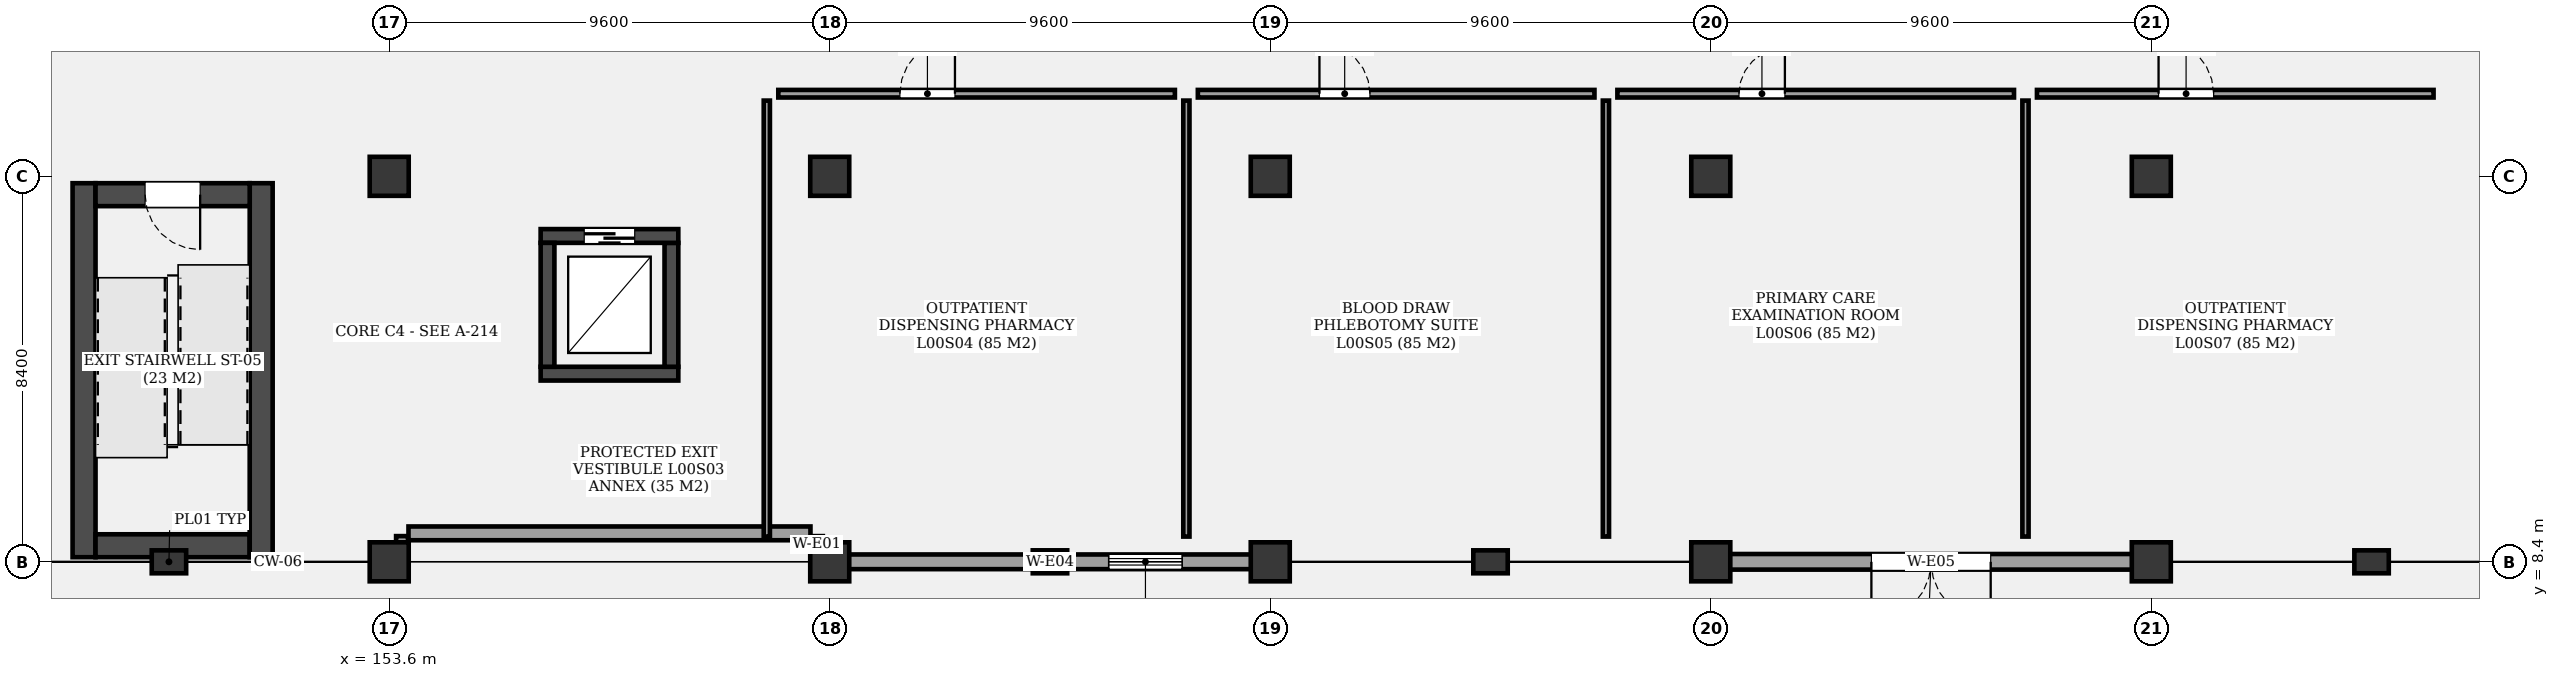
"""IFC4 building model, lengths in metres.
Left out: names, types, materials, properties, quantities, classifications, styles, units other than length and angle.
Written with IfcOpenShell. Run it as: python <this file> out.ifc"""

import sys

from ifc_helpers import new_model, si_unit, direction, frame, frame_2d, origin, origin_2d, place, context, subcontext, project, spatial, rectangle, extrude, element, fill, save


model = new_model("IFC4")
c1 = context("Model", 3, precision=1e-05, world=origin(), true_north=direction((0.0, 1.0)))
c2 = subcontext(c1, "Body", "Model", "MODEL_VIEW")
j1 = project(units=[si_unit("LENGTHUNIT", "METRE"), si_unit("PLANEANGLEUNIT", "RADIAN")], contexts=[c1])
p1 = place(None, origin())
s1 = spatial("IfcSite", under=j1, at=p1, CompositionType="ELEMENT")
p2 = place(p1, origin())
s2 = spatial("IfcBuilding", under=s1, at=p2, CompositionType="ELEMENT")
p3 = place(p2, origin())
s3 = spatial("IfcBuildingStorey", under=s2, at=p3, CompositionType="ELEMENT", Elevation=0.0)
for number, where, z_axis, x_axis in (
    (1, (153.6, 8.4, -0.35), (0.0, 0.0, 1.0), (1.0, 0.0, 0.0)),
    (2, (153.6, 16.8, -0.35), (0.0, 0.0, 1.0), (1.0, 0.0, 0.0)),
    (3, (163.2, 8.4, -0.35), (0.0, 0.0, 1.0), (1.0, 0.0, 0.0)),
    (4, (163.2, 16.8, -0.35), (0.0, 0.0, 1.0), (1.0, 0.0, 0.0)),
    (5, (172.8, 8.4, -0.35), (0.0, 0.0, 1.0), (1.0, 0.0, 0.0)),
    (6, (172.8, 16.8, -0.35), (0.0, 0.0, 1.0), (1.0, 0.0, 0.0)),
    (7, (182.4, 8.4, -0.35), (0.0, 0.0, 1.0), (1.0, 0.0, 0.0)),
    (8, (182.4, 16.8, -0.35), (0.0, 0.0, 1.0), (1.0, 0.0, 0.0)),
    (9, (192.0, 8.4, -0.35), (0.0, 0.0, 1.0), (1.0, 0.0, 0.0)),
    (10, (192.0, 16.8, -0.35), (0.0, 0.0, 1.0), (1.0, 0.0, 0.0)),
):
    element("IfcColumn", number, at=place(p3, frame(where, z_axis=z_axis, x_axis=x_axis)), inside=s3, PredefinedType="COLUMN", context=c2, shape_type="SweptSolid", body=[
        extrude(rectangle(XDim=0.85, YDim=0.85, at=origin_2d()), origin(), (0.0, 0.0, 1.0), 5.45),
    ])
for number, where, z_axis, x_axis in (
    (11, (148.8, 8.4, 0.0), (0.0, 0.0, 1.0), (1.0, 0.0, 0.0)),
    (12, (168.0, 8.4, 0.0), (0.0, 0.0, 1.0), (1.0, 0.0, 0.0)),
    (13, (177.6, 8.4, 0.0), (0.0, 0.0, 1.0), (1.0, 0.0, 0.0)),
    (14, (196.8, 8.4, 0.0), (0.0, 0.0, 1.0), (1.0, 0.0, 0.0)),
):
    element("IfcColumn", number, at=place(p3, frame(where, z_axis=z_axis, x_axis=x_axis)), inside=s3, PredefinedType="PILASTER", context=c2, shape_type="SweptSolid", body=[
        extrude(rectangle(XDim=0.75, YDim=0.5, at=origin_2d()), origin(), (0.0, 0.0, 1.0), 5.1),
    ])
p4 = place(p3, frame((146.95, 16.65, 0.0), z_axis=(0.0, 0.0, 1.0), x_axis=(0.0, -1.0, 0.0)))
e15 = element("IfcWall", 15, at=p4, inside=s3, PredefinedType="SHEAR", context=c2, shape_type="SweptSolid", body=[
    extrude(rectangle(XDim=8.15, YDim=0.5, at=frame_2d((4.075, 0.0))), origin(), (0.0, 0.0, 1.0), 5.1),
])
p5 = place(p3, frame((147.2, 8.75, 0.0), z_axis=(0.0, 0.0, 1.0), x_axis=(1.0, 0.0, 0.0)))
e16 = element("IfcWall", 16, at=p5, inside=s3, PredefinedType="SHEAR", context=c2, shape_type="SweptSolid", body=[
    extrude(rectangle(XDim=3.36, YDim=0.5, at=frame_2d((1.68, 0.0))), origin(), (0.0, 0.0, 1.0), 5.1),
])
p6 = place(p3, frame((150.81, 8.5, 0.0), z_axis=(0.0, 0.0, 1.0), x_axis=(0.0, 1.0, 0.0)))
e17 = element("IfcWall", 17, at=p6, inside=s3, PredefinedType="SHEAR", context=c2, shape_type="SweptSolid", body=[
    extrude(rectangle(XDim=8.15, YDim=0.5, at=frame_2d((4.075, 0.0))), origin(), (0.0, 0.0, 1.0), 5.1),
])
p7 = place(p3, frame((150.56, 16.4, 0.0), z_axis=(0.0, 0.0, 1.0), x_axis=(-1.0, 0.0, 0.0)))
e18 = element("IfcWall", 18, at=p7, inside=s3, PredefinedType="SHEAR", context=c2, shape_type="SweptSolid", body=[
    extrude(rectangle(XDim=3.36, YDim=0.5, at=frame_2d((1.68, 0.0))), origin(), (0.0, 0.0, 1.0), 5.1),
])
p8 = place(p7, frame((1.08, 0.0, 0.0)))
e19 = element("IfcOpeningElement", 19, at=p8, cuts=e18, PredefinedType="OPENING", context=c2, shape_type="SweptSolid", body=[
    extrude(rectangle(XDim=1.2, YDim=2.2, at=frame_2d((0.6, 1.1))), frame((0.0, 0.26, 0.0), z_axis=(0.0, -1.0, 0.0), x_axis=(1.0, 0.0, 0.0)), (0.0, 0.0, 1.0), 0.52),
])
p9 = place(p3, frame((156.9, 12.5, 0.0), z_axis=(0.0, 0.0, 1.0), x_axis=(1.0, 0.0, 0.0)))
e20 = element("IfcWall", 20, at=p9, inside=s3, PredefinedType="SHEAR", context=c2, shape_type="SweptSolid", body=[
    extrude(rectangle(XDim=3.0, YDim=0.3, at=frame_2d((1.5, 0.0))), origin(), (0.0, 0.0, 1.0), 5.1),
])
p10 = place(p3, frame((159.75, 12.65, 0.0), z_axis=(0.0, 0.0, 1.0), x_axis=(0.0, 1.0, 0.0)))
e21 = element("IfcWall", 21, at=p10, inside=s3, PredefinedType="SHEAR", context=c2, shape_type="SweptSolid", body=[
    extrude(rectangle(XDim=2.7, YDim=0.3, at=frame_2d((1.35, 0.0))), origin(), (0.0, 0.0, 1.0), 5.1),
])
p11 = place(p3, frame((159.9, 15.5, 0.0), z_axis=(0.0, 0.0, 1.0), x_axis=(-1.0, 0.0, 0.0)))
e22 = element("IfcWall", 22, at=p11, inside=s3, PredefinedType="SHEAR", context=c2, shape_type="SweptSolid", body=[
    extrude(rectangle(XDim=3.0, YDim=0.3, at=frame_2d((1.5, 0.0))), origin(), (0.0, 0.0, 1.0), 5.1),
])
p12 = place(p11, frame((0.95, 0.0, 0.0)))
e23 = element("IfcOpeningElement", 23, at=p12, cuts=e22, PredefinedType="OPENING", context=c2, shape_type="SweptSolid", body=[
    extrude(rectangle(XDim=1.1, YDim=2.2, at=frame_2d((0.55, 1.1))), frame((0.0, 0.16, 0.0), z_axis=(0.0, -1.0, 0.0), x_axis=(1.0, 0.0, 0.0)), (0.0, 0.0, 1.0), 0.32),
])
p13 = place(p3, frame((157.05, 15.35, 0.0), z_axis=(0.0, 0.0, 1.0), x_axis=(0.0, -1.0, 0.0)))
e24 = element("IfcWall", 24, at=p13, inside=s3, PredefinedType="SHEAR", context=c2, shape_type="SweptSolid", body=[
    extrude(rectangle(XDim=2.7, YDim=0.3, at=frame_2d((1.35, 0.0))), origin(), (0.0, 0.0, 1.0), 5.1),
])
for number, where, z_axis, x_axis in (
    (25, (162.92, 8.6, 0.0), (0.0, 0.0, 1.0), (0.0, 1.0, 0.0)),
    (26, (153.88, 8.6, 0.0), (0.0, 0.0, 1.0), (0.0, 1.0, 0.0)),
):
    element("IfcWall", number, at=place(p3, frame(where, z_axis=z_axis, x_axis=x_axis)), inside=s3, PredefinedType="SOLIDWALL", context=c2, shape_type="SweptSolid", body=[
        extrude(rectangle(XDim=0.36, YDim=0.26, at=frame_2d((0.18, 0.0))), origin(), (0.0, 0.0, 1.0), 4.24),
    ])
p14 = place(p3, frame((162.78, 9.02, 0.0), z_axis=(0.0, 0.0, 1.0), x_axis=(-1.0, 0.0, 0.0)))
e27 = element("IfcWall", 27, at=p14, inside=s3, PredefinedType="SOLIDWALL", context=c2, shape_type="SweptSolid", body=[
    extrude(rectangle(XDim=8.76, YDim=0.3, at=frame_2d((4.38, 0.0))), origin(), (0.0, 0.0, 1.0), 4.24),
])
p15 = place(p3, frame((172.8, 8.4, 0.0), z_axis=(0.0, 0.0, 1.0), x_axis=(-1.0, 0.0, 0.0)))
e28 = element("IfcWall", 28, at=p15, inside=s3, PredefinedType="SOLIDWALL", context=c2, shape_type="SweptSolid", body=[
    extrude(rectangle(XDim=9.6, YDim=0.32, at=frame_2d((4.8, 0.0))), origin(), (0.0, 0.0, 1.0), 4.24),
])
p16 = place(p15, frame((1.92, 0.0, 0.85)))
e29 = element("IfcOpeningElement", 29, at=p16, cuts=e28, PredefinedType="OPENING", context=c2, shape_type="SweptSolid", body=[
    extrude(rectangle(XDim=1.6, YDim=1.4, at=frame_2d((0.8, 0.7))), frame((0.0, 0.17, 0.0), z_axis=(0.0, -1.0, 0.0), x_axis=(1.0, 0.0, 0.0)), (0.0, 0.0, 1.0), 0.34),
])
p17 = place(p3, frame((192.0, 8.4, 0.0), z_axis=(0.0, 0.0, 1.0), x_axis=(-1.0, 0.0, 0.0)))
e30 = element("IfcWall", 30, at=p17, inside=s3, PredefinedType="SOLIDWALL", context=c2, shape_type="SweptSolid", body=[
    extrude(rectangle(XDim=9.6, YDim=0.34, at=frame_2d((4.8, 0.0))), origin(), (0.0, 0.0, 1.0), 4.24),
])
p18 = place(p17, frame((3.5, 0.0, 0.0)))
e31 = element("IfcOpeningElement", 31, at=p18, cuts=e30, PredefinedType="OPENING", context=c2, shape_type="SweptSolid", body=[
    extrude(rectangle(XDim=2.6, YDim=2.6, at=frame_2d((1.3, 1.3))), frame((0.0, 0.18, 0.0), z_axis=(0.0, -1.0, 0.0), x_axis=(1.0, 0.0, 0.0)), (0.0, 0.0, 1.0), 0.36),
])
p19 = place(p3, frame((162.079, 18.6, 0.0), z_axis=(0.0, 0.0, 1.0), x_axis=(1.0, 0.0, 0.0)))
e32 = element("IfcWall", 32, at=p19, inside=s3, PredefinedType="PARTITIONING", context=c2, shape_type="SweptSolid", body=[
    extrude(rectangle(XDim=8.643, YDim=0.165, at=frame_2d((4.321, 0.0))), origin(), (0.0, 0.0, 1.0), 3.98),
])
p20 = place(p19, frame((2.65, 0.0, 0.0)))
e33 = element("IfcOpeningElement", 33, at=p20, cuts=e32, PredefinedType="OPENING", context=c2, shape_type="SweptSolid", body=[
    extrude(rectangle(XDim=1.2, YDim=2.4, at=frame_2d((0.6, 1.2))), frame((0.0, 0.093, 0.0), z_axis=(0.0, -1.0, 0.0), x_axis=(1.0, 0.0, 0.0)), (0.0, 0.0, 1.0), 0.185),
])
p21 = place(p3, frame((161.829, 8.95, 0.0), z_axis=(0.0, 0.0, 1.0), x_axis=(0.0, 1.0, 0.0)))
e34 = element("IfcWall", 34, at=p21, inside=s3, PredefinedType="PARTITIONING", context=c2, shape_type="SweptSolid", body=[
    extrude(rectangle(XDim=9.5, YDim=0.135, at=frame_2d((4.75, 0.0))), origin(), (0.0, 0.0, 1.0), 3.98),
])
p22 = place(p3, frame((171.222, 18.6, 0.0), z_axis=(0.0, 0.0, 1.0), x_axis=(1.0, 0.0, 0.0)))
e35 = element("IfcWall", 35, at=p22, inside=s3, PredefinedType="PARTITIONING", context=c2, shape_type="SweptSolid", body=[
    extrude(rectangle(XDim=8.643, YDim=0.165, at=frame_2d((4.322, 0.0))), origin(), (0.0, 0.0, 1.0), 3.98),
])
p23 = place(p22, frame((2.65, 0.0, 0.0)))
e36 = element("IfcOpeningElement", 36, at=p23, cuts=e35, PredefinedType="OPENING", context=c2, shape_type="SweptSolid", body=[
    extrude(rectangle(XDim=1.1, YDim=2.1, at=frame_2d((0.55, 1.05))), frame((0.0, 0.093, 0.0), z_axis=(0.0, -1.0, 0.0), x_axis=(1.0, 0.0, 0.0)), (0.0, 0.0, 1.0), 0.185),
])
p24 = place(p3, frame((170.972, 8.95, 0.0), z_axis=(0.0, 0.0, 1.0), x_axis=(0.0, 1.0, 0.0)))
e37 = element("IfcWall", 37, at=p24, inside=s3, PredefinedType="PARTITIONING", context=c2, shape_type="SweptSolid", body=[
    extrude(rectangle(XDim=9.5, YDim=0.135, at=frame_2d((4.75, 0.0))), origin(), (0.0, 0.0, 1.0), 3.98),
])
p25 = place(p3, frame((180.365, 18.6, 0.0), z_axis=(0.0, 0.0, 1.0), x_axis=(1.0, 0.0, 0.0)))
e38 = element("IfcWall", 38, at=p25, inside=s3, PredefinedType="PARTITIONING", context=c2, shape_type="SweptSolid", body=[
    extrude(rectangle(XDim=8.643, YDim=0.165, at=frame_2d((4.322, 0.0))), origin(), (0.0, 0.0, 1.0), 3.98),
])
p26 = place(p25, frame((2.65, 0.0, 0.0)))
e39 = element("IfcOpeningElement", 39, at=p26, cuts=e38, PredefinedType="OPENING", context=c2, shape_type="SweptSolid", body=[
    extrude(rectangle(XDim=1.0, YDim=2.1, at=frame_2d((0.5, 1.05))), frame((0.0, 0.093, 0.0), z_axis=(0.0, -1.0, 0.0), x_axis=(1.0, 0.0, 0.0)), (0.0, 0.0, 1.0), 0.185),
])
p27 = place(p3, frame((180.115, 8.95, 0.0), z_axis=(0.0, 0.0, 1.0), x_axis=(0.0, 1.0, 0.0)))
e40 = element("IfcWall", 40, at=p27, inside=s3, PredefinedType="PARTITIONING", context=c2, shape_type="SweptSolid", body=[
    extrude(rectangle(XDim=9.5, YDim=0.135, at=frame_2d((4.75, 0.0))), origin(), (0.0, 0.0, 1.0), 3.98),
])
p28 = place(p3, frame((189.508, 18.6, 0.0), z_axis=(0.0, 0.0, 1.0), x_axis=(1.0, 0.0, 0.0)))
e41 = element("IfcWall", 41, at=p28, inside=s3, PredefinedType="PARTITIONING", context=c2, shape_type="SweptSolid", body=[
    extrude(rectangle(XDim=8.643, YDim=0.165, at=frame_2d((4.321, 0.0))), origin(), (0.0, 0.0, 1.0), 3.98),
])
p29 = place(p28, frame((2.65, 0.0, 0.0)))
e42 = element("IfcOpeningElement", 42, at=p29, cuts=e41, PredefinedType="OPENING", context=c2, shape_type="SweptSolid", body=[
    extrude(rectangle(XDim=1.2, YDim=2.4, at=frame_2d((0.6, 1.2))), frame((0.0, 0.093, 0.0), z_axis=(0.0, -1.0, 0.0), x_axis=(1.0, 0.0, 0.0)), (0.0, 0.0, 1.0), 0.185),
])
p30 = place(p3, frame((189.258, 8.95, 0.0), z_axis=(0.0, 0.0, 1.0), x_axis=(0.0, 1.0, 0.0)))
e43 = element("IfcWall", 43, at=p30, inside=s3, PredefinedType="PARTITIONING", context=c2, shape_type="SweptSolid", body=[
    extrude(rectangle(XDim=9.5, YDim=0.135, at=frame_2d((4.75, 0.0))), origin(), (0.0, 0.0, 1.0), 3.98),
])
p31 = place(p8, origin())
e44 = element("IfcDoor", 44, at=p31, inside=s3, OperationType="SINGLE_SWING_LEFT", PredefinedType="DOOR", context=c2, shape_type="SweptSolid", body=[
    extrude(rectangle(XDim=1.2, YDim=2.2, at=frame_2d((0.6, 1.1))), frame((0.0, 0.025, 0.0), z_axis=(0.0, -1.0, 0.0), x_axis=(1.0, 0.0, 0.0)), (0.0, 0.0, 1.0), 0.05),
])
fill(e19, e44)
p32 = place(p12, origin())
e45 = element("IfcDoor", 45, at=p32, inside=s3, OperationType="SLIDING_TO_RIGHT", PredefinedType="DOOR", context=c2, shape_type="SweptSolid", body=[
    extrude(rectangle(XDim=1.1, YDim=2.2, at=frame_2d((0.55, 1.1))), frame((0.0, 0.025, 0.0), z_axis=(0.0, -1.0, 0.0), x_axis=(1.0, 0.0, 0.0)), (0.0, 0.0, 1.0), 0.05),
])
fill(e23, e45)
p33 = place(p16, origin())
e46 = element("IfcWindow", 46, at=p33, inside=s3, PartitioningType="SINGLE_PANEL", PredefinedType="WINDOW", context=c2, shape_type="SweptSolid", body=[
    extrude(rectangle(XDim=1.6, YDim=1.4, at=frame_2d((0.8, 0.7))), frame((0.0, 0.03, 0.0), z_axis=(0.0, -1.0, 0.0), x_axis=(1.0, 0.0, 0.0)), (0.0, 0.0, 1.0), 0.06),
])
fill(e29, e46)
p34 = place(p18, origin())
e47 = element("IfcDoor", 47, at=p34, inside=s3, OperationType="DOUBLE_DOOR_SINGLE_SWING", PredefinedType="DOOR", context=c2, shape_type="SweptSolid", body=[
    extrude(rectangle(XDim=2.6, YDim=2.6, at=frame_2d((1.3, 1.3))), frame((0.0, 0.025, 0.0), z_axis=(0.0, -1.0, 0.0), x_axis=(1.0, 0.0, 0.0)), (0.0, 0.0, 1.0), 0.05),
])
fill(e31, e47)
p35 = place(p20, origin())
e48 = element("IfcDoor", 48, at=p35, inside=s3, OperationType="SINGLE_SWING_RIGHT", PredefinedType="DOOR", context=c2, shape_type="SweptSolid", body=[
    extrude(rectangle(XDim=1.2, YDim=2.4, at=frame_2d((0.6, 1.2))), frame((0.0, 0.025, 0.0), z_axis=(0.0, -1.0, 0.0), x_axis=(1.0, 0.0, 0.0)), (0.0, 0.0, 1.0), 0.05),
])
fill(e33, e48)
p36 = place(p23, origin())
e49 = element("IfcDoor", 49, at=p36, inside=s3, OperationType="SINGLE_SWING_LEFT", PredefinedType="DOOR", context=c2, shape_type="SweptSolid", body=[
    extrude(rectangle(XDim=1.1, YDim=2.1, at=frame_2d((0.55, 1.05))), frame((0.0, 0.025, 0.0), z_axis=(0.0, -1.0, 0.0), x_axis=(1.0, 0.0, 0.0)), (0.0, 0.0, 1.0), 0.05),
])
fill(e36, e49)
p37 = place(p26, origin())
e50 = element("IfcDoor", 50, at=p37, inside=s3, OperationType="SINGLE_SWING_RIGHT", PredefinedType="DOOR", context=c2, shape_type="SweptSolid", body=[
    extrude(rectangle(XDim=1.0, YDim=2.1, at=frame_2d((0.5, 1.05))), frame((0.0, 0.025, 0.0), z_axis=(0.0, -1.0, 0.0), x_axis=(1.0, 0.0, 0.0)), (0.0, 0.0, 1.0), 0.05),
])
fill(e39, e50)
p38 = place(p29, origin())
e51 = element("IfcDoor", 51, at=p38, inside=s3, OperationType="SINGLE_SWING_LEFT", PredefinedType="DOOR", context=c2, shape_type="SweptSolid", body=[
    extrude(rectangle(XDim=1.2, YDim=2.4, at=frame_2d((0.6, 1.2))), frame((0.0, 0.025, 0.0), z_axis=(0.0, -1.0, 0.0), x_axis=(1.0, 0.0, 0.0)), (0.0, 0.0, 1.0), 0.05),
])
fill(e42, e51)
save(model, sys.argv[1])
